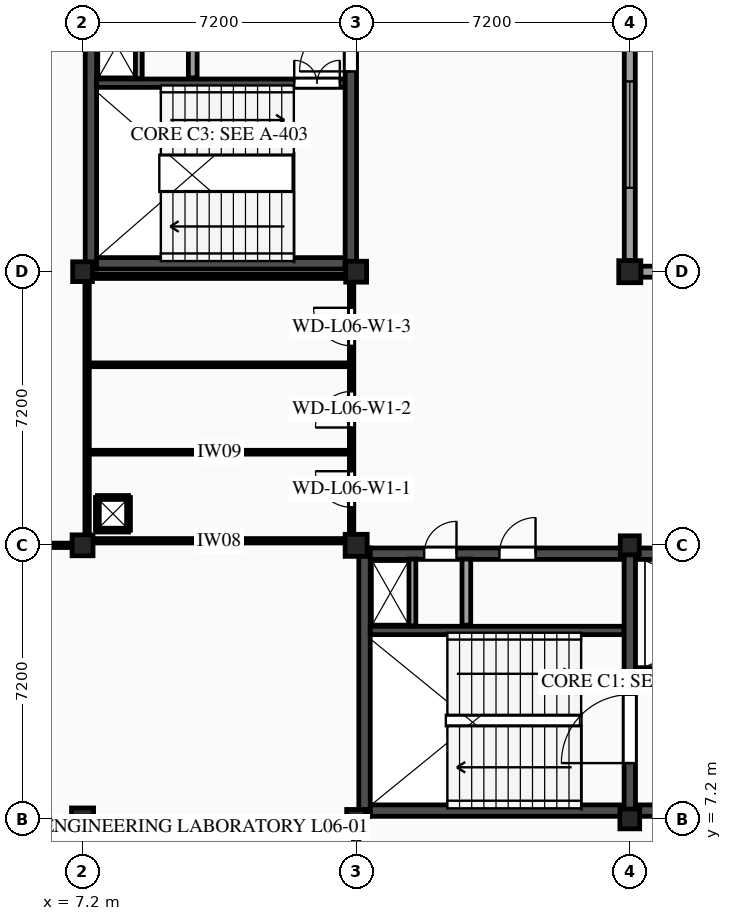
"""IFC4 building model, lengths in metres.
Left out: names, types, materials, properties, quantities, classifications, styles, units other than length and angle.
Written with IfcOpenShell. Run it as: python <this file> out.ifc"""

import sys

from ifc_helpers import new_model, si_unit, direction, frame, frame_2d, origin, origin_2d, place, context, subcontext, project, spatial, rectangle, extrude, element, fill, save


model = new_model("IFC4")
c1 = context("Model", 3, precision=1e-05, world=origin(), true_north=direction((0.0, 1.0)))
c2 = subcontext(c1, "Body", "Model", "MODEL_VIEW")
j1 = project(units=[si_unit("LENGTHUNIT", "METRE"), si_unit("PLANEANGLEUNIT", "RADIAN")], contexts=[c1])
p1 = place(None, origin())
s1 = spatial("IfcSite", under=j1, at=p1, CompositionType="ELEMENT")
p2 = place(p1, origin())
s2 = spatial("IfcBuilding", under=s1, at=p2, CompositionType="ELEMENT")
p3 = place(p2, frame((0.0, 0.0, 26.7)))
s3 = spatial("IfcBuildingStorey", under=s2, at=p3, CompositionType="ELEMENT", Elevation=26.7)
p4 = place(p3, frame((7.2, 7.2, 0.0), z_axis=(0.0, 0.0, 1.0), x_axis=(1.0, 0.0, 0.0)))
e1 = element("IfcColumn", 1, at=p4, inside=s3, PredefinedType="COLUMN", context=c2, shape_type="SweptSolid", body=[
    extrude(rectangle(XDim=0.58, YDim=0.58, at=origin_2d()), origin(), (0.0, 0.0, 1.0), 3.9),
])
p5 = place(p3, frame((7.2, 14.4, 0.0), z_axis=(0.0, 0.0, 1.0), x_axis=(1.0, 0.0, 0.0)))
e2 = element("IfcColumn", 2, at=p5, inside=s3, PredefinedType="COLUMN", context=c2, shape_type="SweptSolid", body=[
    extrude(rectangle(XDim=0.55, YDim=0.55, at=origin_2d()), origin(), (0.0, 0.0, 1.0), 3.9),
])
p6 = place(p3, frame((7.2, 21.6, 0.0), z_axis=(0.0, 0.0, 1.0), x_axis=(1.0, 0.0, 0.0)))
e3 = element("IfcColumn", 3, at=p6, inside=s3, PredefinedType="COLUMN", context=c2, shape_type="SweptSolid", body=[
    extrude(rectangle(XDim=0.52, YDim=0.52, at=origin_2d()), origin(), (0.0, 0.0, 1.0), 3.9),
])
p7 = place(p3, frame((14.4, 7.2, 0.0), z_axis=(0.0, 0.0, 1.0), x_axis=(1.0, 0.0, 0.0)))
e4 = element("IfcColumn", 4, at=p7, inside=s3, PredefinedType="COLUMN", context=c2, shape_type="SweptSolid", body=[
    extrude(rectangle(XDim=0.5, YDim=0.5, at=origin_2d()), origin(), (0.0, 0.0, 1.0), 3.9),
])
p8 = place(p3, frame((14.4, 14.4, 0.0), z_axis=(0.0, 0.0, 1.0), x_axis=(1.0, 0.0, 0.0)))
e5 = element("IfcColumn", 5, at=p8, inside=s3, PredefinedType="COLUMN", context=c2, shape_type="SweptSolid", body=[
    extrude(rectangle(XDim=0.58, YDim=0.58, at=origin_2d()), origin(), (0.0, 0.0, 1.0), 3.9),
])
p9 = place(p3, frame((14.4, 21.6, 0.0), z_axis=(0.0, 0.0, 1.0), x_axis=(1.0, 0.0, 0.0)))
e6 = element("IfcColumn", 6, at=p9, inside=s3, PredefinedType="COLUMN", context=c2, shape_type="SweptSolid", body=[
    extrude(rectangle(XDim=0.55, YDim=0.55, at=origin_2d()), origin(), (0.0, 0.0, 1.0), 3.9),
])
p10 = place(p3, frame((21.6, 7.2, 0.0), z_axis=(0.0, 0.0, 1.0), x_axis=(1.0, 0.0, 0.0)))
e7 = element("IfcColumn", 7, at=p10, inside=s3, PredefinedType="COLUMN", context=c2, shape_type="SweptSolid", body=[
    extrude(rectangle(XDim=0.52, YDim=0.52, at=origin_2d()), origin(), (0.0, 0.0, 1.0), 3.9),
])
p11 = place(p3, frame((21.6, 14.4, 0.0), z_axis=(0.0, 0.0, 1.0), x_axis=(1.0, 0.0, 0.0)))
e8 = element("IfcColumn", 8, at=p11, inside=s3, PredefinedType="COLUMN", context=c2, shape_type="SweptSolid", body=[
    extrude(rectangle(XDim=0.5, YDim=0.5, at=origin_2d()), origin(), (0.0, 0.0, 1.0), 3.9),
])
p12 = place(p3, frame((21.6, 21.6, 0.0), z_axis=(0.0, 0.0, 1.0), x_axis=(1.0, 0.0, 0.0)))
e9 = element("IfcColumn", 9, at=p12, inside=s3, PredefinedType="COLUMN", context=c2, shape_type="SweptSolid", body=[
    extrude(rectangle(XDim=0.58, YDim=0.58, at=origin_2d()), origin(), (0.0, 0.0, 1.0), 3.9),
])
p13 = place(p3, frame((21.6, 28.525, 0.0), z_axis=(0.0, 0.0, 1.0), x_axis=(0.0, -1.0, 0.0)))
e10 = element("IfcWall", 10, at=p13, inside=s3, PredefinedType="STANDARD", context=c2, shape_type="SweptSolid", body=[
    extrude(rectangle(XDim=6.635, YDim=0.29, at=frame_2d((3.317, 0.0))), origin(), (0.0, 0.0, 1.0), 2.865),
])
p14 = place(p13, frame((1.917, 0.0, 0.98)))
e11 = element("IfcOpeningElement", 11, at=p14, cuts=e10, PredefinedType="OPENING", context=c2, shape_type="SweptSolid", body=[
    extrude(rectangle(XDim=2.8, YDim=1.45, at=frame_2d((1.4, 0.725))), frame((0.0, 0.155, 0.0), z_axis=(0.0, -1.0, 0.0), x_axis=(1.0, 0.0, 0.0)), (0.0, 0.0, 1.0), 0.31),
])
p15 = place(p3, frame((21.89, 21.6, 0.0), z_axis=(0.0, 0.0, 1.0), x_axis=(1.0, 0.0, 0.0)))
e12 = element("IfcWall", 12, at=p15, inside=s3, PredefinedType="STANDARD", context=c2, shape_type="SweptSolid", body=[
    extrude(rectangle(XDim=6.66, YDim=0.29, at=frame_2d((3.33, 0.0))), origin(), (0.0, 0.0, 1.0), 2.865),
])
p16 = place(p15, frame((2.13, 0.0, 0.98)))
e13 = element("IfcOpeningElement", 13, at=p16, cuts=e12, PredefinedType="OPENING", context=c2, shape_type="SweptSolid", body=[
    extrude(rectangle(XDim=2.4, YDim=1.4, at=frame_2d((1.2, 0.7))), frame((0.0, 0.155, 0.0), z_axis=(0.0, -1.0, 0.0), x_axis=(1.0, 0.0, 0.0)), (0.0, 0.0, 1.0), 0.31),
])
p17 = place(p3, frame((14.77, 7.42, 0.0), z_axis=(0.0, 0.0, 1.0), x_axis=(1.0, 0.0, 0.0)))
e14 = element("IfcWall", 14, at=p17, inside=s3, PredefinedType="SHEAR", context=c2, shape_type="SweptSolid", body=[
    extrude(rectangle(XDim=6.68, YDim=0.3, at=frame_2d((3.34, 0.0))), origin(), (0.0, 0.0, 1.0), 3.67),
])
p18 = place(p3, frame((14.62, 14.33, 0.0), z_axis=(0.0, 0.0, 1.0), x_axis=(0.0, -1.0, 0.0)))
e15 = element("IfcWall", 15, at=p18, inside=s3, PredefinedType="SHEAR", context=c2, shape_type="SweptSolid", body=[
    extrude(rectangle(XDim=7.06, YDim=0.3, at=frame_2d((3.53, 0.0))), origin(), (0.0, 0.0, 1.0), 3.67),
])
p19 = place(p3, frame((14.77, 14.18, 0.0), z_axis=(0.0, 0.0, 1.0), x_axis=(1.0, 0.0, 0.0)))
e16 = element("IfcWall", 16, at=p19, inside=s3, PredefinedType="SHEAR", context=c2, shape_type="SweptSolid", body=[
    extrude(rectangle(XDim=6.68, YDim=0.3, at=frame_2d((3.34, 0.0))), origin(), (0.0, 0.0, 1.0), 3.67),
])
p20 = place(p19, frame((1.42, 0.0, 0.0)))
e17 = element("IfcOpeningElement", 17, at=p20, cuts=e16, PredefinedType="OPENING", context=c2, shape_type="SweptSolid", body=[
    extrude(rectangle(XDim=0.85, YDim=2.1, at=frame_2d((0.425, 1.05))), frame((0.0, 0.16, 0.0), z_axis=(0.0, -1.0, 0.0), x_axis=(1.0, 0.0, 0.0)), (0.0, 0.0, 1.0), 0.32),
])
p21 = place(p19, frame((3.4, 0.0, 0.0)))
e18 = element("IfcOpeningElement", 18, at=p21, cuts=e16, PredefinedType="OPENING", context=c2, shape_type="SweptSolid", body=[
    extrude(rectangle(XDim=0.95, YDim=2.15, at=frame_2d((0.475, 1.075))), frame((0.0, 0.16, 0.0), z_axis=(0.0, -1.0, 0.0), x_axis=(1.0, 0.0, 0.0)), (0.0, 0.0, 1.0), 0.32),
])
p22 = place(p3, frame((14.77, 12.16, 0.0), z_axis=(0.0, 0.0, 1.0), x_axis=(1.0, 0.0, 0.0)))
e19 = element("IfcWall", 19, at=p22, inside=s3, PredefinedType="SHEAR", context=c2, shape_type="SweptSolid", body=[
    extrude(rectangle(XDim=6.68, YDim=0.22, at=frame_2d((3.34, 0.0))), origin(), (0.0, 0.0, 1.0), 3.67),
])
p23 = place(p3, frame((17.3, 12.3, 0.0), z_axis=(0.0, 0.0, 1.0), x_axis=(0.0, 1.0, 0.0)))
e20 = element("IfcWall", 20, at=p23, inside=s3, PredefinedType="PARTITIONING", context=c2, shape_type="SweptSolid", body=[
    extrude(rectangle(XDim=1.74, YDim=0.23, at=frame_2d((0.87, 0.0))), origin(), (0.0, 0.0, 1.0), 3.67),
])
p24 = place(p3, frame((15.88, 12.28, 0.0), z_axis=(0.0, 0.0, 1.0), x_axis=(0.0, 1.0, 0.0)))
e21 = element("IfcWall", 21, at=p24, inside=s3, PredefinedType="PARTITIONING", context=c2, shape_type="SweptSolid", body=[
    extrude(rectangle(XDim=1.76, YDim=0.18, at=frame_2d((0.88, 0.0))), origin(), (0.0, 0.0, 1.0), 3.67),
])
p25 = place(p3, frame((21.6, 7.27, 0.0), z_axis=(0.0, 0.0, 1.0), x_axis=(0.0, 1.0, 0.0)))
e22 = element("IfcWall", 22, at=p25, inside=s3, PredefinedType="SHEAR", context=c2, shape_type="SweptSolid", body=[
    extrude(rectangle(XDim=7.06, YDim=0.3, at=frame_2d((3.53, 0.0))), origin(), (0.0, 0.0, 1.0), 3.67),
])
p26 = place(p25, frame((1.4, 0.0, 0.0)))
e23 = element("IfcOpeningElement", 23, at=p26, cuts=e22, PredefinedType="OPENING", context=c2, shape_type="SweptSolid", body=[
    extrude(rectangle(XDim=1.8, YDim=2.2, at=frame_2d((0.9, 1.1))), frame((0.0, 0.16, 0.0), z_axis=(0.0, -1.0, 0.0), x_axis=(1.0, 0.0, 0.0)), (0.0, 0.0, 1.0), 0.32),
])
p27 = place(p3, frame((21.75, 7.42, 0.0), z_axis=(0.0, 0.0, 1.0), x_axis=(1.0, 0.0, 0.0)))
e24 = element("IfcWall", 24, at=p27, inside=s3, PredefinedType="SHEAR", context=c2, shape_type="SweptSolid", body=[
    extrude(rectangle(XDim=6.68, YDim=0.3, at=frame_2d((3.34, 0.0))), origin(), (0.0, 0.0, 1.0), 3.67),
])
p28 = place(p27, frame((2.22, 0.0, 0.0)))
e25 = element("IfcOpeningElement", 25, at=p28, cuts=e24, PredefinedType="OPENING", context=c2, shape_type="SweptSolid", body=[
    extrude(rectangle(XDim=1.8, YDim=2.2, at=frame_2d((0.9, 1.1))), frame((0.0, 0.16, 0.0), z_axis=(0.0, -1.0, 0.0), x_axis=(1.0, 0.0, 0.0)), (0.0, 0.0, 1.0), 0.32),
])
p29 = place(p3, frame((21.75, 14.18, 0.0), z_axis=(0.0, 0.0, 1.0), x_axis=(1.0, 0.0, 0.0)))
e26 = element("IfcWall", 26, at=p29, inside=s3, PredefinedType="SHEAR", context=c2, shape_type="SweptSolid", body=[
    extrude(rectangle(XDim=6.68, YDim=0.3, at=frame_2d((3.34, 0.0))), origin(), (0.0, 0.0, 1.0), 3.67),
])
p30 = place(p3, frame((21.75, 11.05, 0.0), z_axis=(0.0, 0.0, 1.0), x_axis=(1.0, 0.0, 0.0)))
e27 = element("IfcWall", 27, at=p30, inside=s3, PredefinedType="SHEAR", context=c2, shape_type="SweptSolid", body=[
    extrude(rectangle(XDim=6.68, YDim=0.26, at=frame_2d((3.34, 0.0))), origin(), (0.0, 0.0, 1.0), 3.67),
])
p31 = place(p30, frame((0.95, 0.0, 0.0)))
e28 = element("IfcOpeningElement", 28, at=p31, cuts=e27, PredefinedType="OPENING", context=c2, shape_type="SweptSolid", body=[
    extrude(rectangle(XDim=1.1, YDim=2.2, at=frame_2d((0.55, 1.1))), frame((0.0, 0.14, 0.0), z_axis=(0.0, -1.0, 0.0), x_axis=(1.0, 0.0, 0.0)), (0.0, 0.0, 1.0), 0.28),
])
p32 = place(p30, frame((4.1, 0.0, 0.0)))
e29 = element("IfcOpeningElement", 29, at=p32, cuts=e27, PredefinedType="OPENING", context=c2, shape_type="SweptSolid", body=[
    extrude(rectangle(XDim=1.0, YDim=2.15, at=frame_2d((0.5, 1.075))), frame((0.0, 0.14, 0.0), z_axis=(0.0, -1.0, 0.0), x_axis=(1.0, 0.0, 0.0)), (0.0, 0.0, 1.0), 0.28),
])
p33 = place(p3, frame((7.57, 21.82, 0.0), z_axis=(0.0, 0.0, 1.0), x_axis=(1.0, 0.0, 0.0)))
e30 = element("IfcWall", 30, at=p33, inside=s3, PredefinedType="SHEAR", context=c2, shape_type="SweptSolid", body=[
    extrude(rectangle(XDim=6.54, YDim=0.3, at=frame_2d((3.27, 0.0))), origin(), (0.0, 0.0, 1.0), 3.67),
])
p34 = place(p3, frame((7.42, 28.73, 0.0), z_axis=(0.0, 0.0, 1.0), x_axis=(0.0, -1.0, 0.0)))
e31 = element("IfcWall", 31, at=p34, inside=s3, PredefinedType="SHEAR", context=c2, shape_type="SweptSolid", body=[
    extrude(rectangle(XDim=7.06, YDim=0.3, at=frame_2d((3.53, 0.0))), origin(), (0.0, 0.0, 1.0), 3.67),
])
p35 = place(p3, frame((7.57, 26.56, 0.0), z_axis=(0.0, 0.0, 1.0), x_axis=(1.0, 0.0, 0.0)))
e32 = element("IfcWall", 32, at=p35, inside=s3, PredefinedType="SHEAR", context=c2, shape_type="SweptSolid", body=[
    extrude(rectangle(XDim=6.54, YDim=0.22, at=frame_2d((3.27, 0.0))), origin(), (0.0, 0.0, 1.0), 3.67),
])
p36 = place(p35, frame((5.2, 0.0, 0.0)))
e33 = element("IfcOpeningElement", 33, at=p36, cuts=e32, PredefinedType="OPENING", context=c2, shape_type="SweptSolid", body=[
    extrude(rectangle(XDim=1.2, YDim=2.2, at=frame_2d((0.6, 1.1))), frame((0.0, 0.12, 0.0), z_axis=(0.0, -1.0, 0.0), x_axis=(1.0, 0.0, 0.0)), (0.0, 0.0, 1.0), 0.24),
])
p37 = place(p3, frame((10.1, 26.7, 0.0), z_axis=(0.0, 0.0, 1.0), x_axis=(0.0, 1.0, 0.0)))
e34 = element("IfcWall", 34, at=p37, inside=s3, PredefinedType="PARTITIONING", context=c2, shape_type="SweptSolid", body=[
    extrude(rectangle(XDim=1.74, YDim=0.23, at=frame_2d((0.87, 0.0))), origin(), (0.0, 0.0, 1.0), 3.67),
])
p38 = place(p3, frame((8.68, 26.68, 0.0), z_axis=(0.0, 0.0, 1.0), x_axis=(0.0, 1.0, 0.0)))
e35 = element("IfcWall", 35, at=p38, inside=s3, PredefinedType="PARTITIONING", context=c2, shape_type="SweptSolid", body=[
    extrude(rectangle(XDim=1.76, YDim=0.18, at=frame_2d((0.88, 0.0))), origin(), (0.0, 0.0, 1.0), 3.67),
])
p39 = place(p3, frame((14.26, 21.67, 0.0), z_axis=(0.0, 0.0, 1.0), x_axis=(0.0, 1.0, 0.0)))
e36 = element("IfcWall", 36, at=p39, inside=s3, PredefinedType="SHEAR", context=c2, shape_type="SweptSolid", body=[
    extrude(rectangle(XDim=7.06, YDim=0.3, at=frame_2d((3.53, 0.0))), origin(), (0.0, 0.0, 1.0), 3.67),
])
p40 = place(p39, frame((5.2, 0.0, 0.0)))
e37 = element("IfcOpeningElement", 37, at=p40, cuts=e36, PredefinedType="OPENING", context=c2, shape_type="SweptSolid", body=[
    extrude(rectangle(XDim=1.35, YDim=2.15, at=frame_2d((0.675, 1.075))), frame((0.0, 0.16, 0.0), z_axis=(0.0, -1.0, 0.0), x_axis=(1.0, 0.0, 0.0)), (0.0, 0.0, 1.0), 0.32),
])
p41 = place(p3, frame((7.48, 14.52, 0.0), z_axis=(0.0, 0.0, 1.0), x_axis=(1.0, 0.0, 0.0)))
e38 = element("IfcWall", 38, at=p41, inside=s3, PredefinedType="PARTITIONING", context=c2, shape_type="SweptSolid", body=[
    extrude(rectangle(XDim=6.625, YDim=0.115, at=frame_2d((3.312, 0.0))), origin(), (0.0, 0.0, 1.0), 3.02),
])
p42 = place(p3, frame((7.465, 21.48, 0.0), z_axis=(0.0, 0.0, 1.0), x_axis=(1.0, 0.0, 0.0)))
e39 = element("IfcWall", 39, at=p42, inside=s3, PredefinedType="PARTITIONING", context=c2, shape_type="SweptSolid", body=[
    extrude(rectangle(XDim=6.655, YDim=0.115, at=frame_2d((3.328, 0.0))), origin(), (0.0, 0.0, 1.0), 3.02),
])
p43 = place(p3, frame((7.32, 14.68, 0.0), z_axis=(0.0, 0.0, 1.0), x_axis=(0.0, 1.0, 0.0)))
e40 = element("IfcWall", 40, at=p43, inside=s3, PredefinedType="PARTITIONING", context=c2, shape_type="SweptSolid", body=[
    extrude(rectangle(XDim=6.655, YDim=0.115, at=frame_2d((3.328, 0.0))), origin(), (0.0, 0.0, 1.0), 2.985),
])
p44 = place(p3, frame((14.28, 14.695, 0.0), z_axis=(0.0, 0.0, 1.0), x_axis=(0.0, 1.0, 0.0)))
e41 = element("IfcWall", 41, at=p44, inside=s3, PredefinedType="PARTITIONING", context=c2, shape_type="SweptSolid", body=[
    extrude(rectangle(XDim=6.625, YDim=0.115, at=frame_2d((3.312, 0.0))), origin(), (0.0, 0.0, 1.0), 2.985),
])
p45 = place(p44, frame((0.705, 0.0, 0.0)))
e42 = element("IfcOpeningElement", 42, at=p45, cuts=e41, PredefinedType="OPENING", context=c2, shape_type="SweptSolid", body=[
    extrude(rectangle(XDim=0.95, YDim=2.1, at=frame_2d((0.475, 1.05))), frame((0.0, 0.067, 0.0), z_axis=(0.0, -1.0, 0.0), x_axis=(1.0, 0.0, 0.0)), (0.0, 0.0, 1.0), 0.135),
])
p46 = place(p44, frame((2.805, 0.0, 0.0)))
e43 = element("IfcOpeningElement", 43, at=p46, cuts=e41, PredefinedType="OPENING", context=c2, shape_type="SweptSolid", body=[
    extrude(rectangle(XDim=0.95, YDim=2.1, at=frame_2d((0.475, 1.05))), frame((0.0, 0.067, 0.0), z_axis=(0.0, -1.0, 0.0), x_axis=(1.0, 0.0, 0.0)), (0.0, 0.0, 1.0), 0.135),
])
p47 = place(p44, frame((4.955, 0.0, 0.0)))
e44 = element("IfcOpeningElement", 44, at=p47, cuts=e41, PredefinedType="OPENING", context=c2, shape_type="SweptSolid", body=[
    extrude(rectangle(XDim=1.0, YDim=2.15, at=frame_2d((0.5, 1.075))), frame((0.0, 0.067, 0.0), z_axis=(0.0, -1.0, 0.0), x_axis=(1.0, 0.0, 0.0)), (0.0, 0.0, 1.0), 0.135),
])
for number, where, z_axis, x_axis in (
    (45, (7.4, 16.85, 0.0), (0.0, 0.0, 1.0), (1.0, 0.0, 0.0)),
    (46, (7.4, 19.15, 0.0), (0.0, 0.0, 1.0), (1.0, 0.0, 0.0)),
):
    element("IfcWall", number, at=place(p3, frame(where, z_axis=z_axis, x_axis=x_axis)), inside=s3, PredefinedType="PARTITIONING", context=c2, shape_type="SweptSolid", body=[
        extrude(rectangle(XDim=6.8, YDim=0.1, at=frame_2d((3.4, 0.0))), origin(), (0.0, 0.0, 1.0), 3.67),
    ])
p48 = place(p3, frame((7.59, 14.8, 0.0), z_axis=(0.0, 0.0, 1.0), x_axis=(1.0, 0.0, 0.0)))
e47 = element("IfcWall", 47, at=p48, inside=s3, PredefinedType="PARTITIONING", context=c2, shape_type="SweptSolid", body=[
    extrude(rectangle(XDim=0.82, YDim=0.1, at=frame_2d((0.41, 0.0))), origin(), (0.0, 0.0, 1.0), 3.67),
])
p49 = place(p3, frame((8.41, 14.8, 0.0), z_axis=(0.0, 0.0, 1.0), x_axis=(0.0, 1.0, 0.0)))
e48 = element("IfcWall", 48, at=p49, inside=s3, PredefinedType="PARTITIONING", context=c2, shape_type="SweptSolid", body=[
    extrude(rectangle(XDim=0.86, YDim=0.1, at=frame_2d((0.43, 0.0))), origin(), (0.0, 0.0, 1.0), 3.67),
])
p50 = place(p3, frame((8.41, 15.66, 0.0), z_axis=(0.0, 0.0, 1.0), x_axis=(-1.0, 0.0, 0.0)))
e49 = element("IfcWall", 49, at=p50, inside=s3, PredefinedType="PARTITIONING", context=c2, shape_type="SweptSolid", body=[
    extrude(rectangle(XDim=0.82, YDim=0.1, at=frame_2d((0.41, 0.0))), origin(), (0.0, 0.0, 1.0), 3.67),
])
p51 = place(p3, frame((7.59, 15.66, 0.0), z_axis=(0.0, 0.0, 1.0), x_axis=(0.0, -1.0, 0.0)))
e50 = element("IfcWall", 50, at=p51, inside=s3, PredefinedType="PARTITIONING", context=c2, shape_type="SweptSolid", body=[
    extrude(rectangle(XDim=0.86, YDim=0.1, at=frame_2d((0.43, 0.0))), origin(), (0.0, 0.0, 1.0), 3.67),
])
p52 = place(p3, frame((0.265, 14.4, 0.0), z_axis=(0.0, 0.0, 1.0), x_axis=(1.0, 0.0, 0.0)))
e51 = element("IfcWall", 51, at=p52, inside=s3, PredefinedType="PARTITIONING", context=c2, shape_type="SweptSolid", body=[
    extrude(rectangle(XDim=6.655, YDim=0.115, at=frame_2d((3.328, 0.0))), origin(), (0.0, 0.0, 1.0), 3.01),
])
p53 = place(p52, frame((2.778, 0.0, 0.0)))
e52 = element("IfcOpeningElement", 52, at=p53, cuts=e51, PredefinedType="OPENING", context=c2, shape_type="SweptSolid", body=[
    extrude(rectangle(XDim=1.1, YDim=2.15, at=frame_2d((0.55, 1.075))), frame((0.0, 0.067, 0.0), z_axis=(0.0, -1.0, 0.0), x_axis=(1.0, 0.0, 0.0)), (0.0, 0.0, 1.0), 0.135),
])
p54 = place(p3, frame((14.4, 0.265, 0.0), z_axis=(0.0, 0.0, 1.0), x_axis=(0.0, 1.0, 0.0)))
e53 = element("IfcWall", 53, at=p54, inside=s3, PredefinedType="PARTITIONING", context=c2, shape_type="SweptSolid", body=[
    extrude(rectangle(XDim=6.68, YDim=0.145, at=frame_2d((3.34, 0.0))), origin(), (0.0, 0.0, 1.0), 3.04),
])
p55 = place(p54, frame((2.7, 0.0, 0.0)))
e54 = element("IfcOpeningElement", 54, at=p55, cuts=e53, PredefinedType="OPENING", context=c2, shape_type="SweptSolid", body=[
    extrude(rectangle(XDim=1.28, YDim=2.24, at=frame_2d((0.64, 1.12))), frame((0.0, 0.083, 0.0), z_axis=(0.0, -1.0, 0.0), x_axis=(1.0, 0.0, 0.0)), (0.0, 0.0, 1.0), 0.165),
])
p56 = place(p14, origin())
e55 = element("IfcWindow", 55, at=p56, inside=s3, PartitioningType="SINGLE_PANEL", PredefinedType="WINDOW", context=c2, shape_type="SweptSolid", body=[
    extrude(rectangle(XDim=2.8, YDim=1.45, at=frame_2d((1.4, 0.725))), frame((0.0, -0.03, 0.0), z_axis=(0.0, -1.0, 0.0), x_axis=(1.0, 0.0, 0.0)), (0.0, 0.0, 1.0), 0.06),
])
fill(e11, e55)
p57 = place(p20, origin())
e56 = element("IfcDoor", 56, at=p57, inside=s3, OperationType="SINGLE_SWING_RIGHT", PredefinedType="DOOR", context=c2, shape_type="SweptSolid", body=[
    extrude(rectangle(XDim=0.85, YDim=2.1, at=frame_2d((0.425, 1.05))), frame((0.0, 0.025, 0.0), z_axis=(0.0, -1.0, 0.0), x_axis=(1.0, 0.0, 0.0)), (0.0, 0.0, 1.0), 0.05),
])
fill(e17, e56)
p58 = place(p26, origin())
e57 = element("IfcDoor", 57, at=p58, inside=s3, OperationType="SINGLE_SWING_LEFT", PredefinedType="DOOR", context=c2, shape_type="SweptSolid", body=[
    extrude(rectangle(XDim=1.8, YDim=2.2, at=frame_2d((0.9, 1.1))), frame((0.0, 0.025, 0.0), z_axis=(0.0, -1.0, 0.0), x_axis=(1.0, 0.0, 0.0)), (0.0, 0.0, 1.0), 0.05),
])
fill(e23, e57)
p59 = place(p21, origin())
e58 = element("IfcDoor", 58, at=p59, inside=s3, OperationType="SINGLE_SWING_RIGHT", PredefinedType="DOOR", context=c2, shape_type="SweptSolid", body=[
    extrude(rectangle(XDim=0.95, YDim=2.15, at=frame_2d((0.475, 1.075))), frame((0.0, 0.025, 0.0), z_axis=(0.0, -1.0, 0.0), x_axis=(1.0, 0.0, 0.0)), (0.0, 0.0, 1.0), 0.05),
])
fill(e18, e58)
p60 = place(p36, origin())
e59 = element("IfcDoor", 59, at=p60, inside=s3, OperationType="DOUBLE_DOOR_SINGLE_SWING", PredefinedType="DOOR", context=c2, shape_type="SweptSolid", body=[
    extrude(rectangle(XDim=1.2, YDim=2.2, at=frame_2d((0.6, 1.1))), frame((0.0, 0.025, 0.0), z_axis=(0.0, -1.0, 0.0), x_axis=(1.0, 0.0, 0.0)), (0.0, 0.0, 1.0), 0.05),
])
fill(e33, e59)
p61 = place(p40, origin())
e60 = element("IfcDoor", 60, at=p61, inside=s3, OperationType="SINGLE_SWING_LEFT", PredefinedType="DOOR", context=c2, shape_type="SweptSolid", body=[
    extrude(rectangle(XDim=1.35, YDim=2.15, at=frame_2d((0.675, 1.075))), frame((0.0, 0.025, 0.0), z_axis=(0.0, -1.0, 0.0), x_axis=(1.0, 0.0, 0.0)), (0.0, 0.0, 1.0), 0.05),
])
fill(e37, e60)
p62 = place(p45, origin())
e61 = element("IfcDoor", 61, at=p62, inside=s3, OperationType="SINGLE_SWING_RIGHT", PredefinedType="DOOR", context=c2, shape_type="SweptSolid", body=[
    extrude(rectangle(XDim=0.95, YDim=2.1, at=frame_2d((0.475, 1.05))), frame((0.0, 0.025, 0.0), z_axis=(0.0, -1.0, 0.0), x_axis=(1.0, 0.0, 0.0)), (0.0, 0.0, 1.0), 0.05),
])
fill(e42, e61)
p63 = place(p46, origin())
e62 = element("IfcDoor", 62, at=p63, inside=s3, OperationType="SINGLE_SWING_LEFT", PredefinedType="DOOR", context=c2, shape_type="SweptSolid", body=[
    extrude(rectangle(XDim=0.95, YDim=2.1, at=frame_2d((0.475, 1.05))), frame((0.0, 0.025, 0.0), z_axis=(0.0, -1.0, 0.0), x_axis=(1.0, 0.0, 0.0)), (0.0, 0.0, 1.0), 0.05),
])
fill(e43, e62)
p64 = place(p47, origin())
e63 = element("IfcDoor", 63, at=p64, inside=s3, OperationType="SINGLE_SWING_RIGHT", PredefinedType="DOOR", context=c2, shape_type="SweptSolid", body=[
    extrude(rectangle(XDim=1.0, YDim=2.15, at=frame_2d((0.5, 1.075))), frame((0.0, 0.025, 0.0), z_axis=(0.0, -1.0, 0.0), x_axis=(1.0, 0.0, 0.0)), (0.0, 0.0, 1.0), 0.05),
])
fill(e44, e63)
save(model, sys.argv[1])
